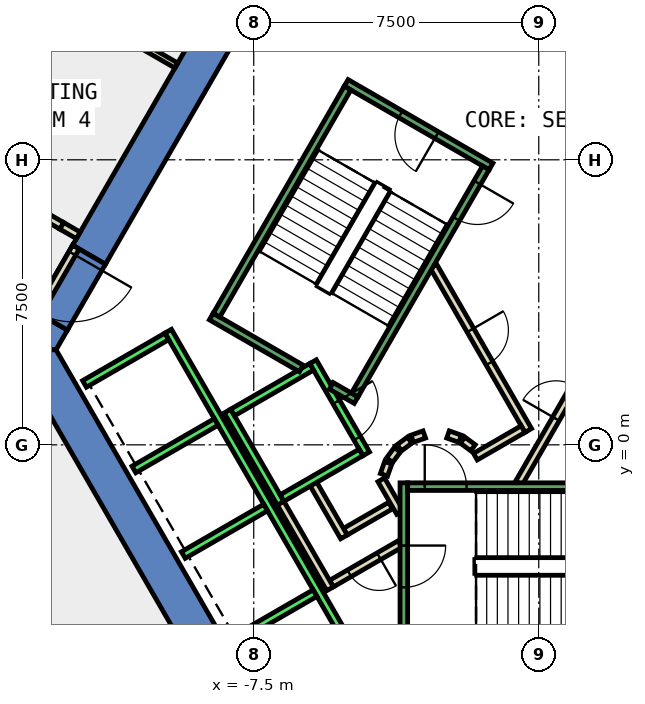
"""IFC4 building model, lengths in metres.
Left out: names, types, materials, properties, quantities, classifications, styles, units other than length and angle.
Written with IfcOpenShell. Run it as: python <this file> out.ifc"""

import sys

from ifc_helpers import new_model, si_unit, direction, frame, frame_2d, origin, place, context, subcontext, project, spatial, polyline, rectangle, outline, extrude, element, fill, save


model = new_model("IFC4")
c1 = context("Model", 3, precision=1e-05, world=origin(), true_north=direction((0.0, 1.0)))
c2 = subcontext(c1, "Body", "Model", "MODEL_VIEW")
j1 = project(units=[si_unit("LENGTHUNIT", "METRE"), si_unit("PLANEANGLEUNIT", "RADIAN")], contexts=[c1])
p1 = place(None, origin())
s1 = spatial("IfcSite", under=j1, at=p1, CompositionType="ELEMENT")
p2 = place(p1, origin())
s2 = spatial("IfcBuilding", under=s1, at=p2, CompositionType="ELEMENT")
p3 = place(p2, frame((0.0, 0.0, 35.0)))
s3 = spatial("IfcBuildingStorey", under=s2, at=p3, CompositionType="ELEMENT", Elevation=35.0)
p4 = place(p3, frame((0.0, 0.0, -0.6)))
e1 = element("IfcWall", 1, at=p4, inside=s3, PredefinedType="SHEAR", context=c2, shape_type="SweptSolid", body=[
    extrude(outline(polyline([(-12.267, 5.252), (-11.402, 4.752), (-6.351, 13.5), (-6.928, 14.5), (-12.267, 5.252)])), origin(), (0.0, 0.0, 1.0), 4.4),
])
p5 = place(p3, frame((0.0, 0.0, -0.6)))
e2 = element("IfcWall", 2, at=p5, inside=s3, PredefinedType="SHEAR", context=c2, shape_type="SweptSolid", body=[
    extrude(outline(polyline([(-12.402, 3.02), (-13.267, 3.52), (-13.856, 2.5), (-12.702, 2.5), (-12.402, 3.02)])), origin(), (0.0, 0.0, 1.0), 4.4),
])
p6 = place(p3, frame((0.0, 0.0, 3.6)))
e3 = element("IfcWall", 3, at=p6, inside=s3, PredefinedType="SHEAR", context=c2, shape_type="SweptSolid", body=[
    extrude(outline(polyline([(-13.267, 3.52), (-12.402, 3.02), (-11.402, 4.752), (-12.267, 5.252), (-13.267, 3.52)])), origin(), (0.0, 0.0, 1.0), 0.2),
])
p7 = place(p3, frame((0.0, 0.0, -0.6)))
e4 = element("IfcWall", 4, at=p7, inside=s3, PredefinedType="SHEAR", context=c2, shape_type="SweptSolid", body=[
    extrude(outline(polyline([(-13.856, 2.5), (-6.928, -9.5), (-6.351, -8.5), (-12.702, 2.5), (-13.856, 2.5)])), origin(), (0.0, 0.0, 1.0), 4.4),
])
p8 = place(p3, frame((-15.963, 7.733, 0.0), z_axis=(0.0, 0.0, 1.0), x_axis=(0.865965832374, -0.500103166518, 0.0)))
e5 = element("IfcWall", 5, at=p8, inside=s3, PredefinedType="PARTITIONING", context=c2, shape_type="SweptSolid", body=[
    extrude(rectangle(XDim=3.941, YDim=0.2, at=frame_2d((1.971, 0.0))), origin(), (0.0, 0.0, 1.0), 3.8),
])
p9 = place(p3, frame((-3.9, -1.599, 0.0), z_axis=(0.0, 0.0, 1.0), x_axis=(-0.865969445389, -0.500096910261, 0.0)))
e6 = element("IfcWall", 6, at=p9, inside=s3, PredefinedType="PARTITIONING", context=c2, shape_type="SweptSolid", body=[
    extrude(rectangle(XDim=1.373, YDim=0.2, at=frame_2d((0.687, 0.0))), origin(), (0.0, 0.0, 1.0), 3.8),
])
p10 = place(p3, frame((-5.126, -2.422, 0.0), z_axis=(0.0, 0.0, 1.0), x_axis=(-0.500062241894, 0.865989465428, 0.0)))
e7 = element("IfcWall", 7, at=p10, inside=s3, PredefinedType="PARTITIONING", context=c2, shape_type="SweptSolid", body=[
    extrude(rectangle(XDim=1.7, YDim=0.2, at=frame_2d((0.85, 0.0))), origin(), (0.0, 0.0, 1.0), 3.8),
])
p11 = place(p3, frame((-3.65, -2.61, 0.0), z_axis=(0.0, 0.0, 1.0), x_axis=(-0.866072462134, -0.499918483688, 0.0)))
e8 = element("IfcWall", 8, at=p11, inside=s3, PredefinedType="PARTITIONING", context=c2, shape_type="SweptSolid", body=[
    extrude(rectangle(XDim=2.084, YDim=0.2, at=frame_2d((1.042, 0.0))), origin(), (0.0, 0.0, 1.0), 3.8),
])
p12 = place(p11, frame((0.642, 0.0, 0.0)))
e9 = element("IfcOpeningElement", 9, at=p12, cuts=e8, PredefinedType="OPENING", context=c2, shape_type="SweptSolid", body=[
    extrude(rectangle(XDim=0.9, YDim=2.1, at=frame_2d((0.45, 1.05))), frame((0.0, 0.11, 0.0), z_axis=(0.0, -1.0, 0.0), x_axis=(1.0, 0.0, 0.0)), (0.0, 0.0, 1.0), 0.22),
])
p13 = place(p3, frame((-5.492, -3.788, 0.0), z_axis=(0.0, 0.0, 1.0), x_axis=(-0.500008949224, 0.866020236886, 0.0)))
e10 = element("IfcWall", 10, at=p13, inside=s3, PredefinedType="PARTITIONING", context=c2, shape_type="SweptSolid", body=[
    extrude(rectangle(XDim=2.68, YDim=0.2, at=frame_2d((1.34, 0.0))), origin(), (0.0, 0.0, 1.0), 3.8),
])
p14 = place(p3, frame((-4.145, -0.92, 0.0), z_axis=(0.0, 0.0, 1.0), x_axis=(0.499743786207, -0.866173278362, 0.0)))
e11 = element("IfcWall", 11, at=p14, inside=s3, PredefinedType="PARTITIONING", context=c2, shape_type="SweptSolid", body=[
    extrude(rectangle(XDim=0.991, YDim=0.2, at=frame_2d((0.495, 0.0))), origin(), (0.0, 0.0, 1.0), 3.8),
])
p15 = place(p3, frame((-13.554, 12.3, 0.0), z_axis=(0.0, 0.0, 1.0), x_axis=(0.866028685375, -0.499994316075, 0.0)))
e12 = element("IfcWall", 12, at=p15, inside=s3, PredefinedType="PARTITIONING", context=c2, shape_type="SweptSolid", body=[
    extrude(rectangle(XDim=4.638, YDim=0.15, at=frame_2d((2.319, 0.0))), origin(), (0.0, 0.0, 1.0), 3.8),
])
p16 = place(p3, frame((-0.52, -1.0, 0.0), z_axis=(0.0, 0.0, 1.0), x_axis=(0.50011622646, 0.865958290007, 0.0)))
e13 = element("IfcWall", 13, at=p16, inside=s3, PredefinedType="PARTITIONING", context=c2, shape_type="SweptSolid", body=[
    extrude(rectangle(XDim=4.991, YDim=0.2, at=frame_2d((2.496, 0.0))), origin(), (0.0, 0.0, 1.0), 3.8),
])
p17 = place(p16, frame((1.945, 0.0, 0.0)))
e14 = element("IfcOpeningElement", 14, at=p17, cuts=e13, PredefinedType="OPENING", context=c2, shape_type="SweptSolid", body=[
    extrude(rectangle(XDim=1.0, YDim=2.1, at=frame_2d((0.5, 1.05))), frame((0.0, 0.11, 0.0), z_axis=(0.0, -1.0, 0.0), x_axis=(1.0, 0.0, 0.0)), (0.0, 0.0, 1.0), 0.22),
])
p18 = place(p3, frame((-2.771, 4.7, 0.0), z_axis=(0.0, 0.0, 1.0), x_axis=(0.499969479948, -0.866043023828, 0.0)))
e15 = element("IfcWall", 15, at=p18, inside=s3, PredefinedType="PARTITIONING", context=c2, shape_type="SweptSolid", body=[
    extrude(rectangle(XDim=4.99, YDim=0.2, at=frame_2d((2.495, 0.0))), origin(), (0.0, 0.0, 1.0), 3.8),
])
p19 = place(p18, frame((1.945, 0.0, 0.0)))
e16 = element("IfcOpeningElement", 16, at=p19, cuts=e15, PredefinedType="OPENING", context=c2, shape_type="SweptSolid", body=[
    extrude(rectangle(XDim=1.0, YDim=2.1, at=frame_2d((0.5, 1.05))), frame((0.0, 0.11, 0.0), z_axis=(0.0, -1.0, 0.0), x_axis=(1.0, 0.0, 0.0)), (0.0, 0.0, 1.0), 0.22),
])
p20 = place(p3, frame((-0.412, 0.414, 0.0), z_axis=(0.0, 0.0, 1.0), x_axis=(-0.866017369001, -0.500013916395, 0.0)))
e17 = element("IfcWall", 17, at=p20, inside=s3, PredefinedType="PARTITIONING", context=c2, shape_type="SweptSolid", body=[
    extrude(rectangle(XDim=1.45, YDim=0.2, at=frame_2d((0.725, 0.0))), origin(), (0.0, 0.0, 1.0), 3.8),
])
p21 = place(p3, frame((-1.731, -0.077, 0.0), z_axis=(0.0, 0.0, 1.0), x_axis=(-0.804311165252, 0.594208338422, 0.0)))
e18 = element("IfcWall", 18, at=p21, inside=s3, PredefinedType="PARTITIONING", context=c2, shape_type="SweptSolid", body=[
    extrude(rectangle(XDim=0.338, YDim=0.2, at=frame_2d((0.169, 0.0))), origin(), (0.0, 0.0, 1.0), 3.8),
])
p22 = place(p3, frame((-2.07, 0.16, 0.0), z_axis=(0.0, 0.0, 1.0), x_axis=(-0.942199461132, 0.335052496547, 0.0)))
e19 = element("IfcWall", 19, at=p22, inside=s3, PredefinedType="PARTITIONING", context=c2, shape_type="SweptSolid", body=[
    extrude(rectangle(XDim=0.337, YDim=0.2, at=frame_2d((0.169, 0.0))), origin(), (0.0, 0.0, 1.0), 3.8),
])
p23 = place(p3, frame((-3.012, 0.273, 0.0), z_axis=(0.0, 0.0, 1.0), x_axis=(-0.942280615813, -0.334824194261, 0.0)))
e20 = element("IfcWall", 20, at=p23, inside=s3, PredefinedType="PARTITIONING", context=c2, shape_type="SweptSolid", body=[
    extrude(rectangle(XDim=0.338, YDim=0.2, at=frame_2d((0.169, 0.0))), origin(), (0.0, 0.0, 1.0), 3.8),
])
p24 = place(p3, frame((-3.397, 0.124, 0.0), z_axis=(0.0, 0.0, 1.0), x_axis=(-0.804311165252, -0.594208338422, 0.0)))
e21 = element("IfcWall", 21, at=p24, inside=s3, PredefinedType="PARTITIONING", context=c2, shape_type="SweptSolid", body=[
    extrude(rectangle(XDim=0.338, YDim=0.2, at=frame_2d((0.169, 0.0))), origin(), (0.0, 0.0, 1.0), 3.8),
])
p25 = place(p3, frame((-3.723, -0.131, 0.0), z_axis=(0.0, 0.0, 1.0), x_axis=(-0.594675113454, -0.803966112121, 0.0)))
e22 = element("IfcWall", 22, at=p25, inside=s3, PredefinedType="PARTITIONING", context=c2, shape_type="SweptSolid", body=[
    extrude(rectangle(XDim=0.338, YDim=0.2, at=frame_2d((0.169, 0.0))), origin(), (0.0, 0.0, 1.0), 3.8),
])
p26 = place(p3, frame((-3.96, -0.47, 0.0), z_axis=(0.0, 0.0, 1.0), x_axis=(-0.334824194261, -0.942280615813, 0.0)))
e23 = element("IfcWall", 23, at=p26, inside=s3, PredefinedType="PARTITIONING", context=c2, shape_type="SweptSolid", body=[
    extrude(rectangle(XDim=0.338, YDim=0.2, at=frame_2d((0.169, 0.0))), origin(), (0.0, 0.0, 1.0), 3.8),
])
p27 = place(p3, frame((-12.18, 5.202, 0.0), z_axis=(0.0, 0.0, 1.0), x_axis=(-0.50002537861, -0.866010750942, 0.0)))
e24 = element("IfcWall", 24, at=p27, inside=s3, PredefinedType="PARTITIONING", context=c2, shape_type="SweptSolid", body=[
    extrude(rectangle(XDim=2.0, YDim=0.2, at=frame_2d((1.0, 0.0))), origin(), (0.0, 0.0, 1.0), 2.4),
])
p28 = place(p27, frame((0.19, 0.0, 0.0)))
e25 = element("IfcOpeningElement", 25, at=p28, cuts=e24, PredefinedType="OPENING", context=c2, shape_type="SweptSolid", body=[
    extrude(rectangle(XDim=1.8, YDim=2.1, at=frame_2d((0.9, 1.05))), frame((0.0, 0.11, 0.0), z_axis=(0.0, -1.0, 0.0), x_axis=(1.0, 0.0, 0.0)), (0.0, 0.0, 1.0), 0.22),
])
p29 = place(p3, frame((-12.55, 5.762, 0.0), z_axis=(0.0, 0.0, 1.0), x_axis=(0.866071776036, -0.499919672301, 0.0)))
e26 = element("IfcWall", 26, at=p29, inside=s3, PredefinedType="PARTITIONING", context=c2, shape_type="SweptSolid", body=[
    extrude(rectangle(XDim=0.5, YDim=0.2, at=frame_2d((0.25, 0.0))), origin(), (0.0, 0.0, 1.0), 2.4),
])
p30 = place(p3, frame((-5.94, 2.188, 0.0), z_axis=(0.0, 0.0, 1.0), x_axis=(0.49994636267, -0.866056369097, 0.0)))
e27 = element("IfcWall", 27, at=p30, inside=s3, PredefinedType="STANDARD", context=c2, shape_type="SweptSolid", body=[
    extrude(rectangle(XDim=2.8, YDim=0.2, at=frame_2d((1.4, 0.0))), origin(), (0.0, 0.0, 1.0), 3.8),
])
p31 = place(p30, frame((1.225, 0.0, 0.0)))
e28 = element("IfcOpeningElement", 28, at=p31, cuts=e27, PredefinedType="OPENING", context=c2, shape_type="SweptSolid", body=[
    extrude(rectangle(XDim=1.1, YDim=2.1, at=frame_2d((0.55, 1.05))), frame((0.0, 0.11, 0.0), z_axis=(0.0, -1.0, 0.0), x_axis=(1.0, 0.0, 0.0)), (0.0, 0.0, 1.0), 0.22),
])
p32 = place(p3, frame((-8.192, 0.888, 0.0), z_axis=(0.0, 0.0, 1.0), x_axis=(0.49994636267, -0.866056369097, 0.0)))
e29 = element("IfcWall", 29, at=p32, inside=s3, PredefinedType="STANDARD", context=c2, shape_type="SweptSolid", body=[
    extrude(rectangle(XDim=2.8, YDim=0.2, at=frame_2d((1.4, 0.0))), origin(), (0.0, 0.0, 1.0), 3.8),
])
for number, where, z_axis, x_axis in (
    (30, (-5.977, 2.052, 0.0), (0.0, 0.0, 1.0), (-0.866, -0.5, 0.0)),
    (31, (-4.677, -0.2, 0.0), (0.0, 0.0, 1.0), (-0.866, -0.5, 0.0)),
):
    element("IfcWall", number, at=place(p3, frame(where, z_axis=z_axis, x_axis=x_axis)), inside=s3, PredefinedType="STANDARD", context=c2, shape_type="SweptSolid", body=[
        extrude(rectangle(XDim=2.399, YDim=0.2, at=frame_2d((1.2, 0.0))), origin(), (0.0, 0.0, 1.0), 3.8),
    ])
p33 = place(p3, frame((-9.751, 2.99, 0.0), z_axis=(0.0, 0.0, 1.0), x_axis=(0.50000090737, -0.866024879913, 0.0)))
e32 = element("IfcWall", 32, at=p33, inside=s3, PredefinedType="STANDARD", context=c2, shape_type="SweptSolid", body=[
    extrude(rectangle(XDim=10.6, YDim=0.2, at=frame_2d((5.3, 0.0))), origin(), (0.0, 0.0, 1.0), 3.8),
])
p34 = place(p3, frame((-9.788, 2.853, 0.0), z_axis=(0.0, 0.0, 1.0), x_axis=(-0.865998541277, -0.500046524342, 0.0)))
e33 = element("IfcWall", 33, at=p34, inside=s3, PredefinedType="STANDARD", context=c2, shape_type="SweptSolid", body=[
    extrude(rectangle(XDim=2.5, YDim=0.2, at=frame_2d((1.25, 0.0))), origin(), (0.0, 0.0, 1.0), 3.8),
])
for number, where, z_axis, x_axis in (
    (34, (-8.488, 0.602, 0.0), (0.0, 0.0, 1.0), (-0.866, -0.5, 0.0)),
    (35, (-7.188, -1.65, 0.0), (0.0, 0.0, 1.0), (-0.866, -0.5, 0.0)),
    (36, (-5.888, -3.902, 0.0), (0.0, 0.0, 1.0), (-0.866, -0.5, 0.0)),
):
    element("IfcWall", number, at=place(p3, frame(where, z_axis=z_axis, x_axis=x_axis)), inside=s3, PredefinedType="STANDARD", context=c2, shape_type="SweptSolid", body=[
        extrude(rectangle(XDim=2.5, YDim=0.2, at=frame_2d((1.25, 0.0))), origin(), (0.0, 0.0, 1.0), 3.8),
    ])
p35 = place(p3, frame((-3.55, -1.0, 0.0), z_axis=(0.0, 0.0, 1.0), x_axis=(0.0, -1.0, 0.0)))
e37 = element("IfcWall", 37, at=p35, inside=s3, PredefinedType="STANDARD", context=c2, shape_type="SweptSolid", body=[
    extrude(rectangle(XDim=4.4, YDim=0.2, at=frame_2d((2.2, 0.0))), origin(), (0.0, 0.0, 1.0), 3.8),
])
p36 = place(p35, frame((1.65, 0.0, 0.0)))
e38 = element("IfcOpeningElement", 38, at=p36, cuts=e37, PredefinedType="OPENING", context=c2, shape_type="SweptSolid", body=[
    extrude(rectangle(XDim=1.1, YDim=2.2, at=frame_2d((0.55, 1.1))), frame((0.0, 0.11, 0.0), z_axis=(0.0, -1.0, 0.0), x_axis=(1.0, 0.0, 0.0)), (0.0, 0.0, 1.0), 0.22),
])
p37 = place(p3, frame((-3.45, -1.1, 0.0), z_axis=(0.0, 0.0, 1.0), x_axis=(1.0, 0.0, 0.0)))
e39 = element("IfcWall", 39, at=p37, inside=s3, PredefinedType="STANDARD", context=c2, shape_type="SweptSolid", body=[
    extrude(rectangle(XDim=6.9, YDim=0.2, at=frame_2d((3.45, 0.0))), origin(), (0.0, 0.0, 1.0), 3.8),
])
p38 = place(p37, frame((0.45, 0.0, 0.0)))
e40 = element("IfcOpeningElement", 40, at=p38, cuts=e39, PredefinedType="OPENING", context=c2, shape_type="SweptSolid", body=[
    extrude(rectangle(XDim=1.1, YDim=2.2, at=frame_2d((0.55, 1.1))), frame((0.0, 0.11, 0.0), z_axis=(0.0, -1.0, 0.0), x_axis=(1.0, 0.0, 0.0)), (0.0, 0.0, 1.0), 0.22),
])
p39 = place(p3, frame((-1.256, 7.324, 0.0), z_axis=(0.0, 0.0, 1.0), x_axis=(-0.866046073146, 0.499964197906, 0.0)))
e41 = element("IfcWall", 41, at=p39, inside=s3, PredefinedType="STANDARD", context=c2, shape_type="SweptSolid", body=[
    extrude(rectangle(XDim=4.4, YDim=0.2, at=frame_2d((2.2, 0.0))), origin(), (0.0, 0.0, 1.0), 3.8),
])
p40 = place(p39, frame((1.65, 0.0, 0.0)))
e42 = element("IfcOpeningElement", 42, at=p40, cuts=e41, PredefinedType="OPENING", context=c2, shape_type="SweptSolid", body=[
    extrude(rectangle(XDim=1.1, YDim=2.2, at=frame_2d((0.55, 1.1))), frame((0.0, 0.11, 0.0), z_axis=(0.0, -1.0, 0.0), x_axis=(1.0, 0.0, 0.0)), (0.0, 0.0, 1.0), 0.22),
])
p41 = place(p3, frame((-6.25, 2.01, 0.0), z_axis=(0.0, 0.0, 1.0), x_axis=(-0.86611865017, 0.499838457731, 0.0)))
e43 = element("IfcWall", 43, at=p41, inside=s3, PredefinedType="STANDARD", context=c2, shape_type="SweptSolid", body=[
    extrude(rectangle(XDim=2.733, YDim=0.2, at=frame_2d((1.366, 0.0))), origin(), (0.0, 0.0, 1.0), 3.8),
])
p42 = place(p3, frame((-4.806, 1.176, 0.0), z_axis=(0.0, 0.0, 1.0), x_axis=(-0.866558586415, 0.499075361355, 0.0)))
e44 = element("IfcWall", 44, at=p42, inside=s3, PredefinedType="STANDARD", context=c2, shape_type="SweptSolid", body=[
    extrude(rectangle(XDim=0.751, YDim=0.2, at=frame_2d((0.376, 0.0))), origin(), (0.0, 0.0, 1.0), 3.8),
])
p43 = place(p3, frame((-1.393, 7.288, 0.0), z_axis=(0.0, 0.0, 1.0), x_axis=(-0.499963383562, -0.866046543262, 0.0)))
e45 = element("IfcWall", 45, at=p43, inside=s3, PredefinedType="STANDARD", context=c2, shape_type="SweptSolid", body=[
    extrude(rectangle(XDim=6.9, YDim=0.2, at=frame_2d((3.45, 0.0))), origin(), (0.0, 0.0, 1.0), 3.8),
])
p44 = place(p43, frame((0.45, 0.0, 0.0)))
e46 = element("IfcOpeningElement", 46, at=p44, cuts=e45, PredefinedType="OPENING", context=c2, shape_type="SweptSolid", body=[
    extrude(rectangle(XDim=1.1, YDim=2.2, at=frame_2d((0.55, 1.1))), frame((0.0, 0.11, 0.0), z_axis=(0.0, -1.0, 0.0), x_axis=(1.0, 0.0, 0.0)), (0.0, 0.0, 1.0), 0.22),
])
p45 = place(p3, frame((-5.03, 9.388, 0.0), z_axis=(0.0, 0.0, 1.0), x_axis=(-0.499978703459, -0.866037698999, 0.0)))
e47 = element("IfcWall", 47, at=p45, inside=s3, PredefinedType="STANDARD", context=c2, shape_type="SweptSolid", body=[
    extrude(rectangle(XDim=6.9, YDim=0.2, at=frame_2d((3.45, 0.0))), origin(), (0.0, 0.0, 1.0), 3.8),
])
p46 = place(p17, origin())
e48 = element("IfcDoor", 48, at=p46, inside=s3, OperationType="SINGLE_SWING_LEFT", PredefinedType="DOOR", context=c2, shape_type="SweptSolid", body=[
    extrude(rectangle(XDim=1.0, YDim=2.1, at=frame_2d((0.5, 1.05))), frame((0.0, 0.025, 0.0), z_axis=(0.0, -1.0, 0.0), x_axis=(1.0, 0.0, 0.0)), (0.0, 0.0, 1.0), 0.05),
])
fill(e14, e48)
p47 = place(p19, origin())
e49 = element("IfcDoor", 49, at=p47, inside=s3, OperationType="SINGLE_SWING_RIGHT", PredefinedType="DOOR", context=c2, shape_type="SweptSolid", body=[
    extrude(rectangle(XDim=1.0, YDim=2.1, at=frame_2d((0.5, 1.05))), frame((0.0, 0.025, 0.0), z_axis=(0.0, -1.0, 0.0), x_axis=(1.0, 0.0, 0.0)), (0.0, 0.0, 1.0), 0.05),
])
fill(e16, e49)
p48 = place(p12, origin())
e50 = element("IfcDoor", 50, at=p48, inside=s3, OperationType="SINGLE_SWING_LEFT", PredefinedType="DOOR", context=c2, shape_type="SweptSolid", body=[
    extrude(rectangle(XDim=0.9, YDim=2.1, at=frame_2d((0.45, 1.05))), frame((0.0, 0.025, 0.0), z_axis=(0.0, -1.0, 0.0), x_axis=(1.0, 0.0, 0.0)), (0.0, 0.0, 1.0), 0.05),
])
fill(e9, e50)
p49 = place(p28, origin())
e51 = element("IfcDoor", 51, at=p49, inside=s3, OperationType="DOUBLE_DOOR_SINGLE_SWING", PredefinedType="DOOR", context=c2, shape_type="SweptSolid", body=[
    extrude(rectangle(XDim=1.8, YDim=2.1, at=frame_2d((0.9, 1.05))), frame((0.0, 0.025, 0.0), z_axis=(0.0, -1.0, 0.0), x_axis=(1.0, 0.0, 0.0)), (0.0, 0.0, 1.0), 0.05),
])
fill(e25, e51)
p50 = place(p31, origin())
e52 = element("IfcDoor", 52, at=p50, inside=s3, OperationType="SLIDING_TO_LEFT", PredefinedType="DOOR", context=c2, shape_type="SweptSolid", body=[
    extrude(rectangle(XDim=1.1, YDim=2.1, at=frame_2d((0.55, 1.05))), frame((0.0, 0.025, 0.0), z_axis=(0.0, -1.0, 0.0), x_axis=(1.0, 0.0, 0.0)), (0.0, 0.0, 1.0), 0.05),
])
fill(e28, e52)
p51 = place(p38, origin())
e53 = element("IfcDoor", 53, at=p51, inside=s3, OperationType="SINGLE_SWING_LEFT", PredefinedType="DOOR", context=c2, shape_type="SweptSolid", body=[
    extrude(rectangle(XDim=1.1, YDim=2.2, at=frame_2d((0.55, 1.1))), frame((0.0, 0.025, 0.0), z_axis=(0.0, -1.0, 0.0), x_axis=(1.0, 0.0, 0.0)), (0.0, 0.0, 1.0), 0.05),
])
fill(e40, e53)
p52 = place(p36, origin())
e54 = element("IfcDoor", 54, at=p52, inside=s3, OperationType="SINGLE_SWING_LEFT", PredefinedType="DOOR", context=c2, shape_type="SweptSolid", body=[
    extrude(rectangle(XDim=1.1, YDim=2.2, at=frame_2d((0.55, 1.1))), frame((0.0, 0.025, 0.0), z_axis=(0.0, -1.0, 0.0), x_axis=(1.0, 0.0, 0.0)), (0.0, 0.0, 1.0), 0.05),
])
fill(e38, e54)
p53 = place(p44, origin())
e55 = element("IfcDoor", 55, at=p53, inside=s3, OperationType="SINGLE_SWING_LEFT", PredefinedType="DOOR", context=c2, shape_type="SweptSolid", body=[
    extrude(rectangle(XDim=1.1, YDim=2.2, at=frame_2d((0.55, 1.1))), frame((0.0, 0.025, 0.0), z_axis=(0.0, -1.0, 0.0), x_axis=(1.0, 0.0, 0.0)), (0.0, 0.0, 1.0), 0.05),
])
fill(e46, e55)
p54 = place(p40, origin())
e56 = element("IfcDoor", 56, at=p54, inside=s3, OperationType="SINGLE_SWING_LEFT", PredefinedType="DOOR", context=c2, shape_type="SweptSolid", body=[
    extrude(rectangle(XDim=1.1, YDim=2.2, at=frame_2d((0.55, 1.1))), frame((0.0, 0.025, 0.0), z_axis=(0.0, -1.0, 0.0), x_axis=(1.0, 0.0, 0.0)), (0.0, 0.0, 1.0), 0.05),
])
fill(e42, e56)
save(model, sys.argv[1])
